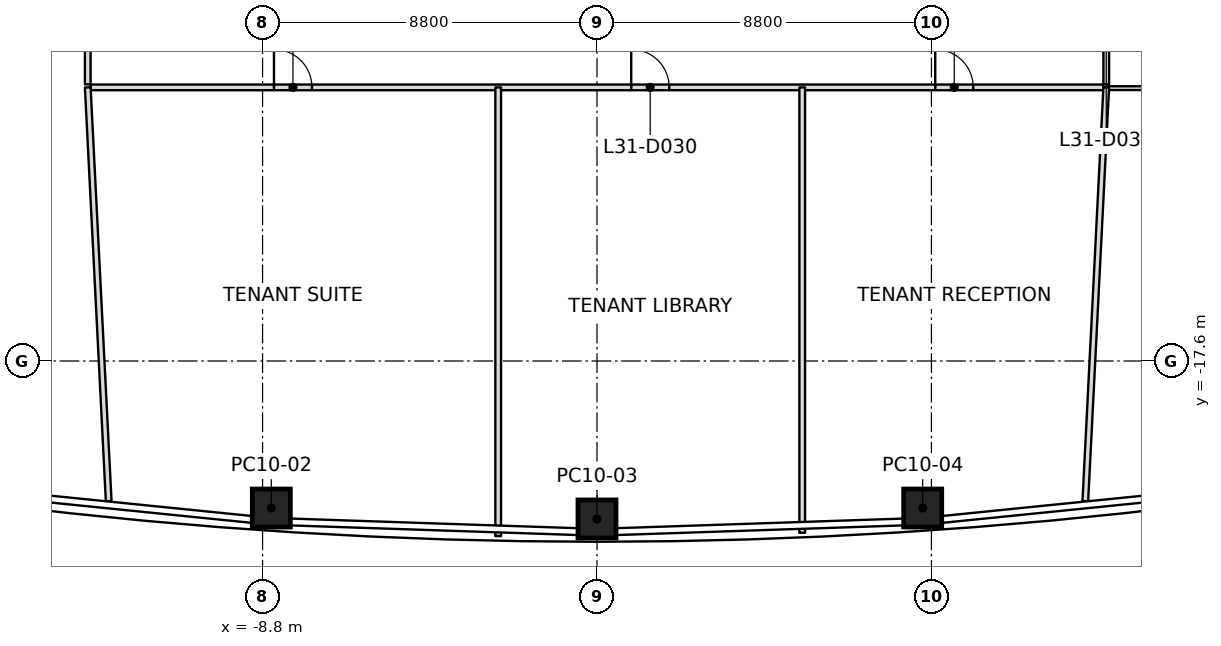
"""IFC4 building model, lengths in metres.
Left out: names, types, materials, properties, quantities, classifications, styles, units other than length and angle.
Written with IfcOpenShell. Run it as: python <this file> out.ifc"""

import sys

from ifc_helpers import new_model, si_unit, direction, frame, frame_2d, origin, origin_2d, place, context, subcontext, project, spatial, rectangle, extrude, element, fill, save


model = new_model("IFC4")
c1 = context("Model", 3, precision=1e-05, world=origin(), true_north=direction((0.0, 1.0)))
c2 = subcontext(c1, "Body", "Model", "MODEL_VIEW")
j1 = project(units=[si_unit("LENGTHUNIT", "METRE"), si_unit("PLANEANGLEUNIT", "RADIAN")], contexts=[c1])
p1 = place(None, origin())
s1 = spatial("IfcSite", under=j1, at=p1, CompositionType="ELEMENT")
p2 = place(p1, origin())
s2 = spatial("IfcBuilding", under=s1, at=p2, CompositionType="ELEMENT")
p3 = place(p2, frame((0.0, 0.0, 145.8)))
s3 = spatial("IfcBuildingStorey", under=s2, at=p3, CompositionType="ELEMENT", Elevation=145.8)
p4 = place(p3, frame((-8.57, -21.469, 0.0), z_axis=(0.008849193104, 0.011229320904, 0.999897791843), x_axis=(-0.997708871927, 0.067169886377, 0.008075471639)))
e1 = element("IfcColumn", 1, at=p4, inside=s3, PredefinedType="COLUMN", context=c2, shape_type="SweptSolid", body=[
    extrude(rectangle(XDim=1.0, YDim=1.0, at=origin_2d()), origin(), (0.0, 0.0, 1.0), 4.0),
])
p5 = place(p3, frame((0.0, -21.757, 0.0), z_axis=(0.0, 0.01141283087, 0.999934871525), x_axis=(1.0, 0.0, 0.0)))
e2 = element("IfcColumn", 2, at=p5, inside=s3, PredefinedType="COLUMN", context=c2, shape_type="SweptSolid", body=[
    extrude(rectangle(XDim=1.0, YDim=1.0, at=origin_2d()), origin(), (0.0, 0.0, 1.0), 4.0),
])
p6 = place(p3, frame((8.57, -21.469, 0.0), z_axis=(-0.008849193104, 0.011229320904, 0.999897791843), x_axis=(0.997708871927, 0.067169886377, 0.008075471639)))
e3 = element("IfcColumn", 3, at=p6, inside=s3, PredefinedType="COLUMN", context=c2, shape_type="SweptSolid", body=[
    extrude(rectangle(XDim=1.0, YDim=1.0, at=origin_2d()), origin(), (0.0, 0.0, 1.0), 4.0),
])
p7 = place(p3, frame((-13.4, -10.4, 0.0), z_axis=(0.0, 0.0, 1.0), x_axis=(0.0505395773, -0.998722058997, 0.0)))
e4 = element("IfcWall", 4, at=p7, inside=s3, PredefinedType="PARTITIONING", context=c2, shape_type="SweptSolid", body=[
    extrude(rectangle(XDim=10.903, YDim=0.15, at=frame_2d((5.451, 0.0))), origin(), (0.0, 0.0, 1.0), 3.234),
])
p8 = place(p3, frame((-2.6, -10.4, 0.0), z_axis=(0.0, 0.0, 1.0), x_axis=(0.0, -1.0, 0.0)))
e5 = element("IfcWall", 5, at=p8, inside=s3, PredefinedType="PARTITIONING", context=c2, shape_type="SweptSolid", body=[
    extrude(rectangle(XDim=11.808, YDim=0.15, at=frame_2d((5.904, 0.0))), origin(), (0.0, 0.0, 1.0), 3.234),
])
p9 = place(p3, frame((5.4, -10.4, 0.0), z_axis=(0.0, 0.0, 1.0), x_axis=(0.0, -1.0, 0.0)))
e6 = element("IfcWall", 6, at=p9, inside=s3, PredefinedType="PARTITIONING", context=c2, shape_type="SweptSolid", body=[
    extrude(rectangle(XDim=11.72, YDim=0.15, at=frame_2d((5.86, 0.0))), origin(), (0.0, 0.0, 1.0), 3.234),
])
p10 = place(p3, frame((13.4, -10.4, 0.0), z_axis=(0.0, 0.0, 1.0), x_axis=(-0.0505395773, -0.998722058997, 0.0)))
e7 = element("IfcWall", 7, at=p10, inside=s3, PredefinedType="PARTITIONING", context=c2, shape_type="SweptSolid", body=[
    extrude(rectangle(XDim=10.903, YDim=0.15, at=frame_2d((5.451, 0.0))), origin(), (0.0, 0.0, 1.0), 3.234),
])
p11 = place(p3, frame((-13.4, 10.32, 0.0), z_axis=(0.0, 0.0, 1.0), x_axis=(0.0, -1.0, 0.0)))
e8 = element("IfcWall", 8, at=p11, inside=s3, PredefinedType="PARTITIONING", context=c2, shape_type="SweptSolid", body=[
    extrude(rectangle(XDim=20.64, YDim=0.15, at=frame_2d((10.32, 0.0))), origin(), (0.0, 0.0, 1.0), 3.166),
])
p12 = place(p11, frame((5.82, 0.0, 0.0)))
e9 = element("IfcOpeningElement", 9, at=p12, cuts=e8, PredefinedType="OPENING", context=c2, shape_type="SweptSolid", body=[
    extrude(rectangle(XDim=1.0, YDim=2.1, at=frame_2d((0.5, 1.05))), frame((0.0, 0.075, 0.0), z_axis=(0.0, -1.0, 0.0), x_axis=(1.0, 0.0, 0.0)), (0.0, 0.0, 1.0), 0.15),
])
p13 = place(p11, frame((14.37, 0.0, 0.0)))
e10 = element("IfcOpeningElement", 10, at=p13, cuts=e8, PredefinedType="OPENING", context=c2, shape_type="SweptSolid", body=[
    extrude(rectangle(XDim=0.9, YDim=2.1, at=frame_2d((0.45, 1.05))), frame((0.0, 0.075, 0.0), z_axis=(0.0, -1.0, 0.0), x_axis=(1.0, 0.0, 0.0)), (0.0, 0.0, 1.0), 0.15),
])
p14 = place(p11, frame((18.38, 0.0, 0.0)))
e11 = element("IfcOpeningElement", 11, at=p14, cuts=e8, PredefinedType="OPENING", context=c2, shape_type="SweptSolid", body=[
    extrude(rectangle(XDim=1.0, YDim=2.1, at=frame_2d((0.5, 1.05))), frame((0.0, 0.075, 0.0), z_axis=(0.0, -1.0, 0.0), x_axis=(1.0, 0.0, 0.0)), (0.0, 0.0, 1.0), 0.15),
])
p15 = place(p3, frame((-13.32, -10.4, 0.0), z_axis=(0.0, 0.0, 1.0), x_axis=(1.0, 0.0, 0.0)))
e12 = element("IfcWall", 12, at=p15, inside=s3, PredefinedType="PARTITIONING", context=c2, shape_type="SweptSolid", body=[
    extrude(rectangle(XDim=26.64, YDim=0.15, at=frame_2d((13.32, 0.0))), origin(), (0.0, 0.0, 1.0), 3.317),
])
p16 = place(p15, frame((4.82, 0.0, 0.0)))
e13 = element("IfcOpeningElement", 13, at=p16, cuts=e12, PredefinedType="OPENING", context=c2, shape_type="SweptSolid", body=[
    extrude(rectangle(XDim=1.0, YDim=2.1, at=frame_2d((0.5, 1.05))), frame((0.0, 0.075, 0.0), z_axis=(0.0, -1.0, 0.0), x_axis=(1.0, 0.0, 0.0)), (0.0, 0.0, 1.0), 0.15),
])
p17 = place(p15, frame((14.22, 0.0, 0.0)))
e14 = element("IfcOpeningElement", 14, at=p17, cuts=e12, PredefinedType="OPENING", context=c2, shape_type="SweptSolid", body=[
    extrude(rectangle(XDim=1.0, YDim=2.1, at=frame_2d((0.5, 1.05))), frame((0.0, 0.075, 0.0), z_axis=(0.0, -1.0, 0.0), x_axis=(1.0, 0.0, 0.0)), (0.0, 0.0, 1.0), 0.15),
])
p18 = place(p15, frame((22.22, 0.0, 0.0)))
e15 = element("IfcOpeningElement", 15, at=p18, cuts=e12, PredefinedType="OPENING", context=c2, shape_type="SweptSolid", body=[
    extrude(rectangle(XDim=1.0, YDim=2.1, at=frame_2d((0.5, 1.05))), frame((0.0, 0.075, 0.0), z_axis=(0.0, -1.0, 0.0), x_axis=(1.0, 0.0, 0.0)), (0.0, 0.0, 1.0), 0.15),
])
p19 = place(p3, frame((13.4, -10.32, 0.0), z_axis=(0.0, 0.0, 1.0), x_axis=(0.0, 1.0, 0.0)))
e16 = element("IfcWall", 16, at=p19, inside=s3, PredefinedType="PARTITIONING", context=c2, shape_type="SweptSolid", body=[
    extrude(rectangle(XDim=20.64, YDim=0.15, at=frame_2d((10.32, 0.0))), origin(), (0.0, 0.0, 1.0), 3.166),
])
p20 = place(p19, frame((16.22, 0.0, 0.0)))
e17 = element("IfcOpeningElement", 17, at=p20, cuts=e16, PredefinedType="OPENING", context=c2, shape_type="SweptSolid", body=[
    extrude(rectangle(XDim=1.0, YDim=2.1, at=frame_2d((0.5, 1.05))), frame((0.0, 0.075, 0.0), z_axis=(0.0, -1.0, 0.0), x_axis=(1.0, 0.0, 0.0)), (0.0, 0.0, 1.0), 0.15),
])
p21 = place(p19, frame((0.95, 0.0, 0.0)))
e18 = element("IfcOpeningElement", 18, at=p21, cuts=e16, PredefinedType="OPENING", context=c2, shape_type="SweptSolid", body=[
    extrude(rectangle(XDim=0.9, YDim=2.1, at=frame_2d((0.45, 1.05))), frame((0.0, 0.075, 0.0), z_axis=(0.0, -1.0, 0.0), x_axis=(1.0, 0.0, 0.0)), (0.0, 0.0, 1.0), 0.15),
])
p22 = place(p19, frame((3.36, 0.0, 0.0)))
e19 = element("IfcOpeningElement", 19, at=p22, cuts=e16, PredefinedType="OPENING", context=c2, shape_type="SweptSolid", body=[
    extrude(rectangle(XDim=1.0, YDim=2.1, at=frame_2d((0.5, 1.05))), frame((0.0, 0.075, 0.0), z_axis=(0.0, -1.0, 0.0), x_axis=(1.0, 0.0, 0.0)), (0.0, 0.0, 1.0), 0.15),
])
p23 = place(p19, frame((8.22, 0.0, 0.0)))
e20 = element("IfcOpeningElement", 20, at=p23, cuts=e16, PredefinedType="OPENING", context=c2, shape_type="SweptSolid", body=[
    extrude(rectangle(XDim=1.0, YDim=2.1, at=frame_2d((0.5, 1.05))), frame((0.0, 0.075, 0.0), z_axis=(0.0, -1.0, 0.0), x_axis=(1.0, 0.0, 0.0)), (0.0, 0.0, 1.0), 0.15),
])
p24 = place(p3, frame((17.0, -10.42, 0.0), z_axis=(0.0, 0.0, 1.0), x_axis=(-1.0, 0.0, 0.0)))
e21 = element("IfcWall", 21, at=p24, inside=s3, PredefinedType="PARTITIONING", context=c2, shape_type="SweptSolid", body=[
    extrude(rectangle(XDim=3.57, YDim=0.1, at=frame_2d((1.785, 0.0))), origin(), (0.0, 0.0, 1.0), 3.166),
])
p25 = place(p16, origin())
e22 = element("IfcDoor", 22, at=p25, inside=s3, OperationType="SINGLE_SWING_RIGHT", PredefinedType="DOOR", context=c2, shape_type="SweptSolid", body=[
    extrude(rectangle(XDim=1.0, YDim=2.1, at=frame_2d((0.5, 1.05))), frame((0.0, 0.025, 0.0), z_axis=(0.0, -1.0, 0.0), x_axis=(1.0, 0.0, 0.0)), (0.0, 0.0, 1.0), 0.05),
])
fill(e13, e22)
p26 = place(p17, origin())
e23 = element("IfcDoor", 23, at=p26, inside=s3, OperationType="SINGLE_SWING_RIGHT", PredefinedType="DOOR", context=c2, shape_type="SweptSolid", body=[
    extrude(rectangle(XDim=1.0, YDim=2.1, at=frame_2d((0.5, 1.05))), frame((0.0, 0.025, 0.0), z_axis=(0.0, -1.0, 0.0), x_axis=(1.0, 0.0, 0.0)), (0.0, 0.0, 1.0), 0.05),
])
fill(e14, e23)
p27 = place(p18, origin())
e24 = element("IfcDoor", 24, at=p27, inside=s3, OperationType="SINGLE_SWING_RIGHT", PredefinedType="DOOR", context=c2, shape_type="SweptSolid", body=[
    extrude(rectangle(XDim=1.0, YDim=2.1, at=frame_2d((0.5, 1.05))), frame((0.0, 0.025, 0.0), z_axis=(0.0, -1.0, 0.0), x_axis=(1.0, 0.0, 0.0)), (0.0, 0.0, 1.0), 0.05),
])
fill(e15, e24)
save(model, sys.argv[1])
